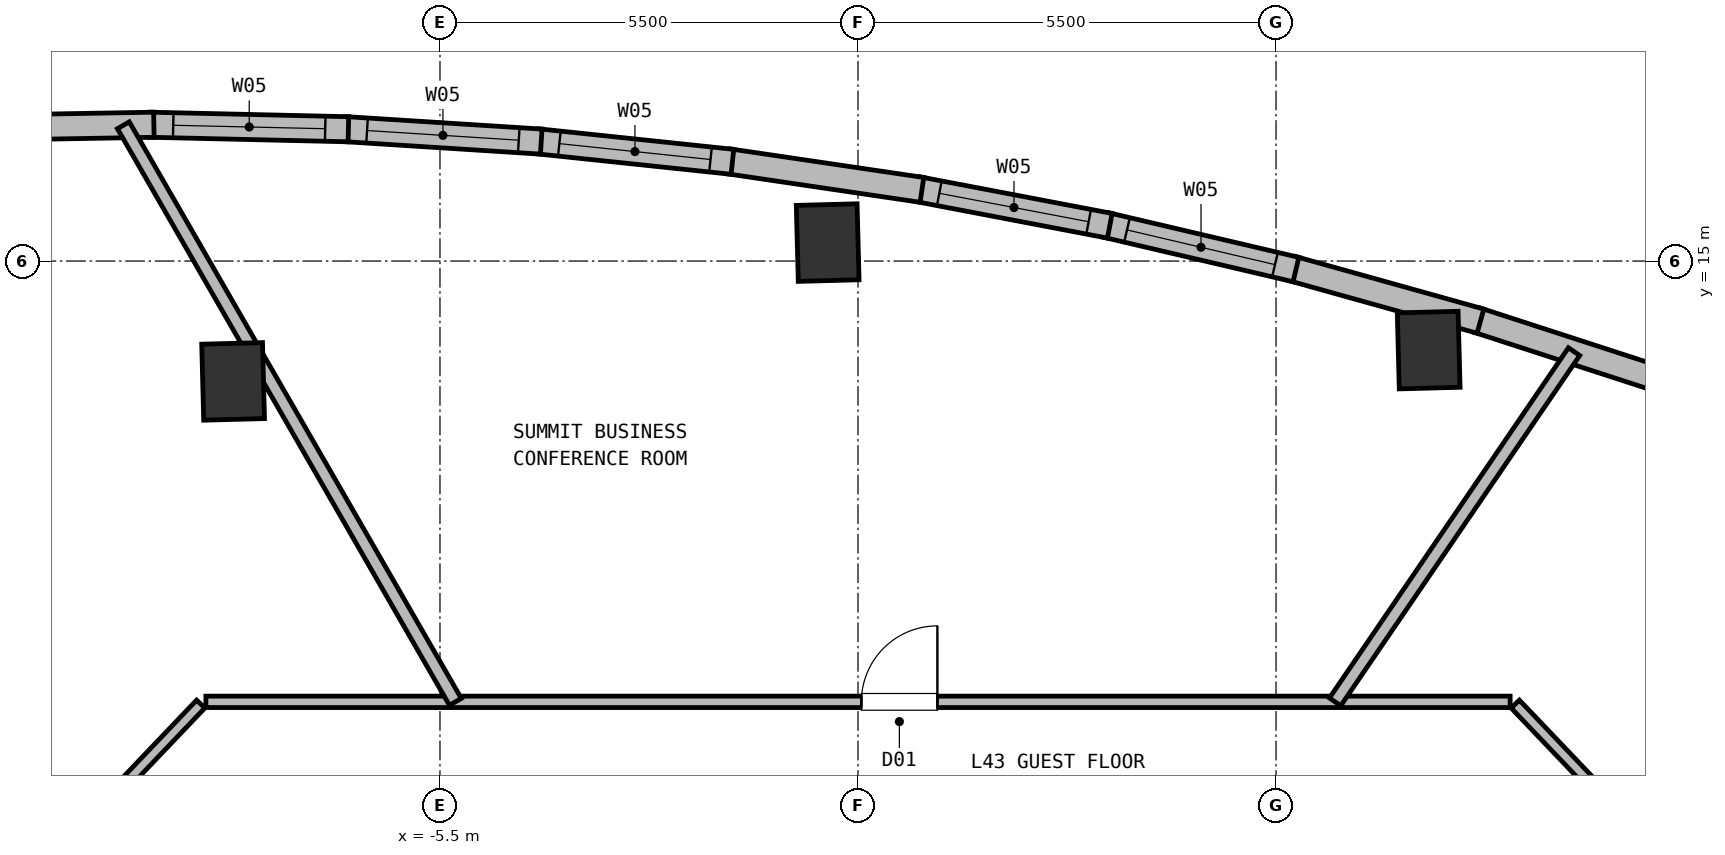
"""IFC4 building model, lengths in metres.
Left out: names, types, materials, properties, quantities, classifications, styles, units other than length and angle.
Written with IfcOpenShell. Run it as: python <this file> out.ifc"""

import sys

from ifc_helpers import new_model, si_unit, direction, frame, frame_2d, origin, origin_2d, place, context, subcontext, project, spatial, rectangle, extrude, element, fill, save


model = new_model("IFC4")
c1 = context("Model", 3, precision=1e-05, world=origin(), true_north=direction((0.0, 1.0)))
c2 = subcontext(c1, "Body", "Model", "MODEL_VIEW")
j1 = project(units=[si_unit("LENGTHUNIT", "METRE"), si_unit("PLANEANGLEUNIT", "RADIAN")], contexts=[c1])
p1 = place(None, origin())
s1 = spatial("IfcSite", under=j1, at=p1, CompositionType="ELEMENT")
p2 = place(p1, origin())
s2 = spatial("IfcBuilding", under=s1, at=p2, CompositionType="ELEMENT")
p3 = place(p2, frame((0.0, 0.0, 173.75)))
s3 = spatial("IfcBuildingStorey", under=s2, at=p3, CompositionType="ELEMENT", Elevation=173.75)
for number, where, z_axis, x_axis in (
    (1, (7.508, 13.828, 0.0), (0.0, 0.0, 1.0), (1.0, 0.026, 0.0)),
    (2, (-0.399, 15.243, 0.0), (0.0, 0.0, 1.0), (1.0, 0.026, 0.0)),
    (3, (-8.222, 13.417, 0.0), (0.0, 0.0, 1.0), (1.0, 0.026, 0.0)),
):
    element("IfcColumn", number, at=place(p3, frame(where, z_axis=z_axis, x_axis=x_axis)), inside=s3, PredefinedType="COLUMN", context=c2, shape_type="SweptSolid", body=[
        extrude(rectangle(XDim=0.8, YDim=1.0, at=origin_2d()), origin(), (0.0, 0.0, 1.0), 4.5),
    ])
p4 = place(p3, frame((8.141, 14.224, 0.0), z_axis=(0.0, 0.0, 1.0), x_axis=(0.951143213295, -0.308750040976, 0.0)))
e4 = element("IfcWall", 4, at=p4, inside=s3, PredefinedType="SOLIDWALL", context=c2, shape_type="SweptSolid", body=[
    extrude(rectangle(XDim=2.579, YDim=0.33, at=frame_2d((1.29, 0.0))), origin(), (0.0, 0.0, 1.0), 4.21),
])
p5 = place(p3, frame((5.713, 14.901, 0.0), z_axis=(0.0, 0.0, 1.0), x_axis=(0.963148250091, -0.268971092028, 0.0)))
e5 = element("IfcWall", 5, at=p5, inside=s3, PredefinedType="SOLIDWALL", context=c2, shape_type="SweptSolid", body=[
    extrude(rectangle(XDim=2.571, YDim=0.33, at=frame_2d((1.285, 0.0))), origin(), (0.0, 0.0, 1.0), 4.21),
])
p6 = place(p3, frame((3.264, 15.474, 0.0), z_axis=(0.0, 0.0, 1.0), x_axis=(0.973560466093, -0.228429461457, 0.0)))
e6 = element("IfcWall", 6, at=p6, inside=s3, PredefinedType="SOLIDWALL", context=c2, shape_type="SweptSolid", body=[
    extrude(rectangle(XDim=2.566, YDim=0.33, at=frame_2d((1.283, 0.0))), origin(), (0.0, 0.0, 1.0), 4.21),
])
p7 = place(p6, frame((0.283, 0.0, 0.72)))
e7 = element("IfcOpeningElement", 7, at=p7, cuts=e6, PredefinedType="OPENING", context=c2, shape_type="SweptSolid", body=[
    extrude(rectangle(XDim=2.0, YDim=2.15, at=frame_2d((1.0, 1.075))), frame((0.0, 0.175, 0.0), z_axis=(0.0, -1.0, 0.0), x_axis=(1.0, 0.0, 0.0)), (0.0, 0.0, 1.0), 0.35),
])
p8 = place(p3, frame((0.792, 15.945, 0.0), z_axis=(0.0, 0.0, 1.0), x_axis=(0.982297739985, -0.187326319616, 0.0)))
e8 = element("IfcWall", 8, at=p8, inside=s3, PredefinedType="SOLIDWALL", context=c2, shape_type="SweptSolid", body=[
    extrude(rectangle(XDim=2.566, YDim=0.33, at=frame_2d((1.283, 0.0))), origin(), (0.0, 0.0, 1.0), 4.21),
])
p9 = place(p8, frame((0.283, 0.0, 0.72)))
e9 = element("IfcOpeningElement", 9, at=p9, cuts=e8, PredefinedType="OPENING", context=c2, shape_type="SweptSolid", body=[
    extrude(rectangle(XDim=2.0, YDim=2.15, at=frame_2d((1.0, 1.075))), frame((0.0, 0.175, 0.0), z_axis=(0.0, -1.0, 0.0), x_axis=(1.0, 0.0, 0.0)), (0.0, 0.0, 1.0), 0.35),
])
p10 = place(p3, frame((-1.702, 16.312, 0.0), z_axis=(0.0, 0.0, 1.0), x_axis=(0.989273720048, -0.14607363493, 0.0)))
e10 = element("IfcWall", 10, at=p10, inside=s3, PredefinedType="SOLIDWALL", context=c2, shape_type="SweptSolid", body=[
    extrude(rectangle(XDim=2.571, YDim=0.33, at=frame_2d((1.285, 0.0))), origin(), (0.0, 0.0, 1.0), 4.21),
])
p11 = place(p3, frame((-4.218, 16.576, 0.0), z_axis=(0.0, 0.0, 1.0), x_axis=(0.994496633441, -0.104768535708, 0.0)))
e11 = element("IfcWall", 11, at=p11, inside=s3, PredefinedType="SOLIDWALL", context=c2, shape_type="SweptSolid", body=[
    extrude(rectangle(XDim=2.58, YDim=0.33, at=frame_2d((1.29, 0.0))), origin(), (0.0, 0.0, 1.0), 4.21),
])
p12 = place(p11, frame((0.29, 0.0, 0.72)))
e12 = element("IfcOpeningElement", 12, at=p12, cuts=e11, PredefinedType="OPENING", context=c2, shape_type="SweptSolid", body=[
    extrude(rectangle(XDim=2.0, YDim=2.15, at=frame_2d((1.0, 1.075))), frame((0.0, 0.175, 0.0), z_axis=(0.0, -1.0, 0.0), x_axis=(1.0, 0.0, 0.0)), (0.0, 0.0, 1.0), 0.35),
])
p13 = place(p3, frame((-6.755, 16.736, 0.0), z_axis=(0.0, 0.0, 1.0), x_axis=(0.99797748118, -0.06356844388, 0.0)))
e13 = element("IfcWall", 13, at=p13, inside=s3, PredefinedType="SOLIDWALL", context=c2, shape_type="SweptSolid", body=[
    extrude(rectangle(XDim=2.592, YDim=0.33, at=frame_2d((1.296, 0.0))), origin(), (0.0, 0.0, 1.0), 4.21),
])
p14 = place(p13, frame((0.296, 0.0, 0.72)))
e14 = element("IfcOpeningElement", 14, at=p14, cuts=e13, PredefinedType="OPENING", context=c2, shape_type="SweptSolid", body=[
    extrude(rectangle(XDim=2.0, YDim=2.15, at=frame_2d((1.0, 1.075))), frame((0.0, 0.175, 0.0), z_axis=(0.0, -1.0, 0.0), x_axis=(1.0, 0.0, 0.0)), (0.0, 0.0, 1.0), 0.35),
])
p15 = place(p3, frame((-9.314, 16.794, 0.0), z_axis=(0.0, 0.0, 1.0), x_axis=(0.999737324595, -0.022919027279, 0.0)))
e15 = element("IfcWall", 15, at=p15, inside=s3, PredefinedType="SOLIDWALL", context=c2, shape_type="SweptSolid", body=[
    extrude(rectangle(XDim=2.61, YDim=0.33, at=frame_2d((1.305, 0.0))), origin(), (0.0, 0.0, 1.0), 4.21),
])
p16 = place(p15, frame((0.305, 0.0, 0.72)))
e16 = element("IfcOpeningElement", 16, at=p16, cuts=e15, PredefinedType="OPENING", context=c2, shape_type="SweptSolid", body=[
    extrude(rectangle(XDim=2.0, YDim=2.15, at=frame_2d((1.0, 1.075))), frame((0.0, 0.175, 0.0), z_axis=(0.0, -1.0, 0.0), x_axis=(1.0, 0.0, 0.0)), (0.0, 0.0, 1.0), 0.35),
])
p17 = place(p3, frame((-11.896, 16.748, 0.0), z_axis=(0.0, 0.0, 1.0), x_axis=(0.999849492065, 0.017349156075, 0.0)))
e17 = element("IfcWall", 17, at=p17, inside=s3, PredefinedType="SOLIDWALL", context=c2, shape_type="SweptSolid", body=[
    extrude(rectangle(XDim=2.632, YDim=0.33, at=frame_2d((1.316, 0.0))), origin(), (0.0, 0.0, 1.0), 4.21),
])
p18 = place(p3, frame((8.648, 9.171, 0.0), z_axis=(0.0, 0.0, 1.0), x_axis=(0.689960858356, -0.723846678473, 0.0)))
e18 = element("IfcWall", 18, at=p18, inside=s3, PredefinedType="PARTITIONING", context=c2, shape_type="SweptSolid", body=[
    extrude(rectangle(XDim=2.572, YDim=0.15, at=frame_2d((1.286, 0.0))), origin(), (0.0, 0.0, 1.0), 4.21),
])
p19 = place(p3, frame((-8.58, 9.2, 0.0), z_axis=(0.0, 0.0, 1.0), x_axis=(1.0, 0.0, 0.0)))
e19 = element("IfcWall", 19, at=p19, inside=s3, PredefinedType="PARTITIONING", context=c2, shape_type="SweptSolid", body=[
    extrude(rectangle(XDim=17.16, YDim=0.15, at=frame_2d((8.58, 0.0))), origin(), (0.0, 0.0, 1.0), 4.21),
])
p20 = place(p19, frame((8.625, 0.0, 0.0)))
e20 = element("IfcOpeningElement", 20, at=p20, cuts=e19, PredefinedType="OPENING", context=c2, shape_type="SweptSolid", body=[
    extrude(rectangle(XDim=1.0, YDim=2.15, at=frame_2d((0.5, 1.075))), frame((0.0, 0.085, 0.0), z_axis=(0.0, -1.0, 0.0), x_axis=(1.0, 0.0, 0.0)), (0.0, 0.0, 1.0), 0.17),
])
p21 = place(p3, frame((-10.422, 7.309, 0.0), z_axis=(0.0, 0.0, 1.0), x_axis=(0.689960858356, 0.723846678473, 0.0)))
e21 = element("IfcWall", 21, at=p21, inside=s3, PredefinedType="PARTITIONING", context=c2, shape_type="SweptSolid", body=[
    extrude(rectangle(XDim=2.572, YDim=0.15, at=frame_2d((1.286, 0.0))), origin(), (0.0, 0.0, 1.0), 4.21),
])
p22 = place(p3, frame((6.277, 9.2, 0.0), z_axis=(0.0, 0.0, 1.0), x_axis=(0.563596172667, 0.826050454969, 0.0)))
e22 = element("IfcWall", 22, at=p22, inside=s3, PredefinedType="PARTITIONING", context=c2, shape_type="SweptSolid", body=[
    extrude(rectangle(XDim=5.579, YDim=0.18, at=frame_2d((2.789, 0.0))), origin(), (0.0, 0.0, 1.0), 4.21),
])
p23 = place(p3, frame((-5.297, 9.2, 0.0), z_axis=(0.0, 0.0, 1.0), x_axis=(-0.498971426458, 0.866618437133, 0.0)))
e23 = element("IfcWall", 23, at=p23, inside=s3, PredefinedType="PARTITIONING", context=c2, shape_type="SweptSolid", body=[
    extrude(rectangle(XDim=8.754, YDim=0.18, at=frame_2d((4.377, 0.0))), origin(), (0.0, 0.0, 1.0), 4.21),
])
p24 = place(p7, origin())
e24 = element("IfcWindow", 24, at=p24, inside=s3, PartitioningType="SINGLE_PANEL", PredefinedType="WINDOW", context=c2, shape_type="SweptSolid", body=[
    extrude(rectangle(XDim=2.0, YDim=2.15, at=frame_2d((1.0, 1.075))), frame((0.0, 0.03, 0.0), z_axis=(0.0, -1.0, 0.0), x_axis=(1.0, 0.0, 0.0)), (0.0, 0.0, 1.0), 0.06),
])
fill(e7, e24)
p25 = place(p9, origin())
e25 = element("IfcWindow", 25, at=p25, inside=s3, PartitioningType="SINGLE_PANEL", PredefinedType="WINDOW", context=c2, shape_type="SweptSolid", body=[
    extrude(rectangle(XDim=2.0, YDim=2.15, at=frame_2d((1.0, 1.075))), frame((0.0, 0.03, 0.0), z_axis=(0.0, -1.0, 0.0), x_axis=(1.0, 0.0, 0.0)), (0.0, 0.0, 1.0), 0.06),
])
fill(e9, e25)
p26 = place(p12, origin())
e26 = element("IfcWindow", 26, at=p26, inside=s3, PartitioningType="SINGLE_PANEL", PredefinedType="WINDOW", context=c2, shape_type="SweptSolid", body=[
    extrude(rectangle(XDim=2.0, YDim=2.15, at=frame_2d((1.0, 1.075))), frame((0.0, 0.03, 0.0), z_axis=(0.0, -1.0, 0.0), x_axis=(1.0, 0.0, 0.0)), (0.0, 0.0, 1.0), 0.06),
])
fill(e12, e26)
p27 = place(p14, origin())
e27 = element("IfcWindow", 27, at=p27, inside=s3, PartitioningType="SINGLE_PANEL", PredefinedType="WINDOW", context=c2, shape_type="SweptSolid", body=[
    extrude(rectangle(XDim=2.0, YDim=2.15, at=frame_2d((1.0, 1.075))), frame((0.0, 0.03, 0.0), z_axis=(0.0, -1.0, 0.0), x_axis=(1.0, 0.0, 0.0)), (0.0, 0.0, 1.0), 0.06),
])
fill(e14, e27)
p28 = place(p16, origin())
e28 = element("IfcWindow", 28, at=p28, inside=s3, PartitioningType="SINGLE_PANEL", PredefinedType="WINDOW", context=c2, shape_type="SweptSolid", body=[
    extrude(rectangle(XDim=2.0, YDim=2.15, at=frame_2d((1.0, 1.075))), frame((0.0, 0.03, 0.0), z_axis=(0.0, -1.0, 0.0), x_axis=(1.0, 0.0, 0.0)), (0.0, 0.0, 1.0), 0.06),
])
fill(e16, e28)
p29 = place(p20, origin())
e29 = element("IfcDoor", 29, at=p29, inside=s3, OperationType="SINGLE_SWING_RIGHT", PredefinedType="DOOR", context=c2, shape_type="SweptSolid", body=[
    extrude(rectangle(XDim=1.0, YDim=2.15, at=frame_2d((0.5, 1.075))), frame((0.0, 0.025, 0.0), z_axis=(0.0, -1.0, 0.0), x_axis=(1.0, 0.0, 0.0)), (0.0, 0.0, 1.0), 0.05),
])
fill(e20, e29)
save(model, sys.argv[1])
